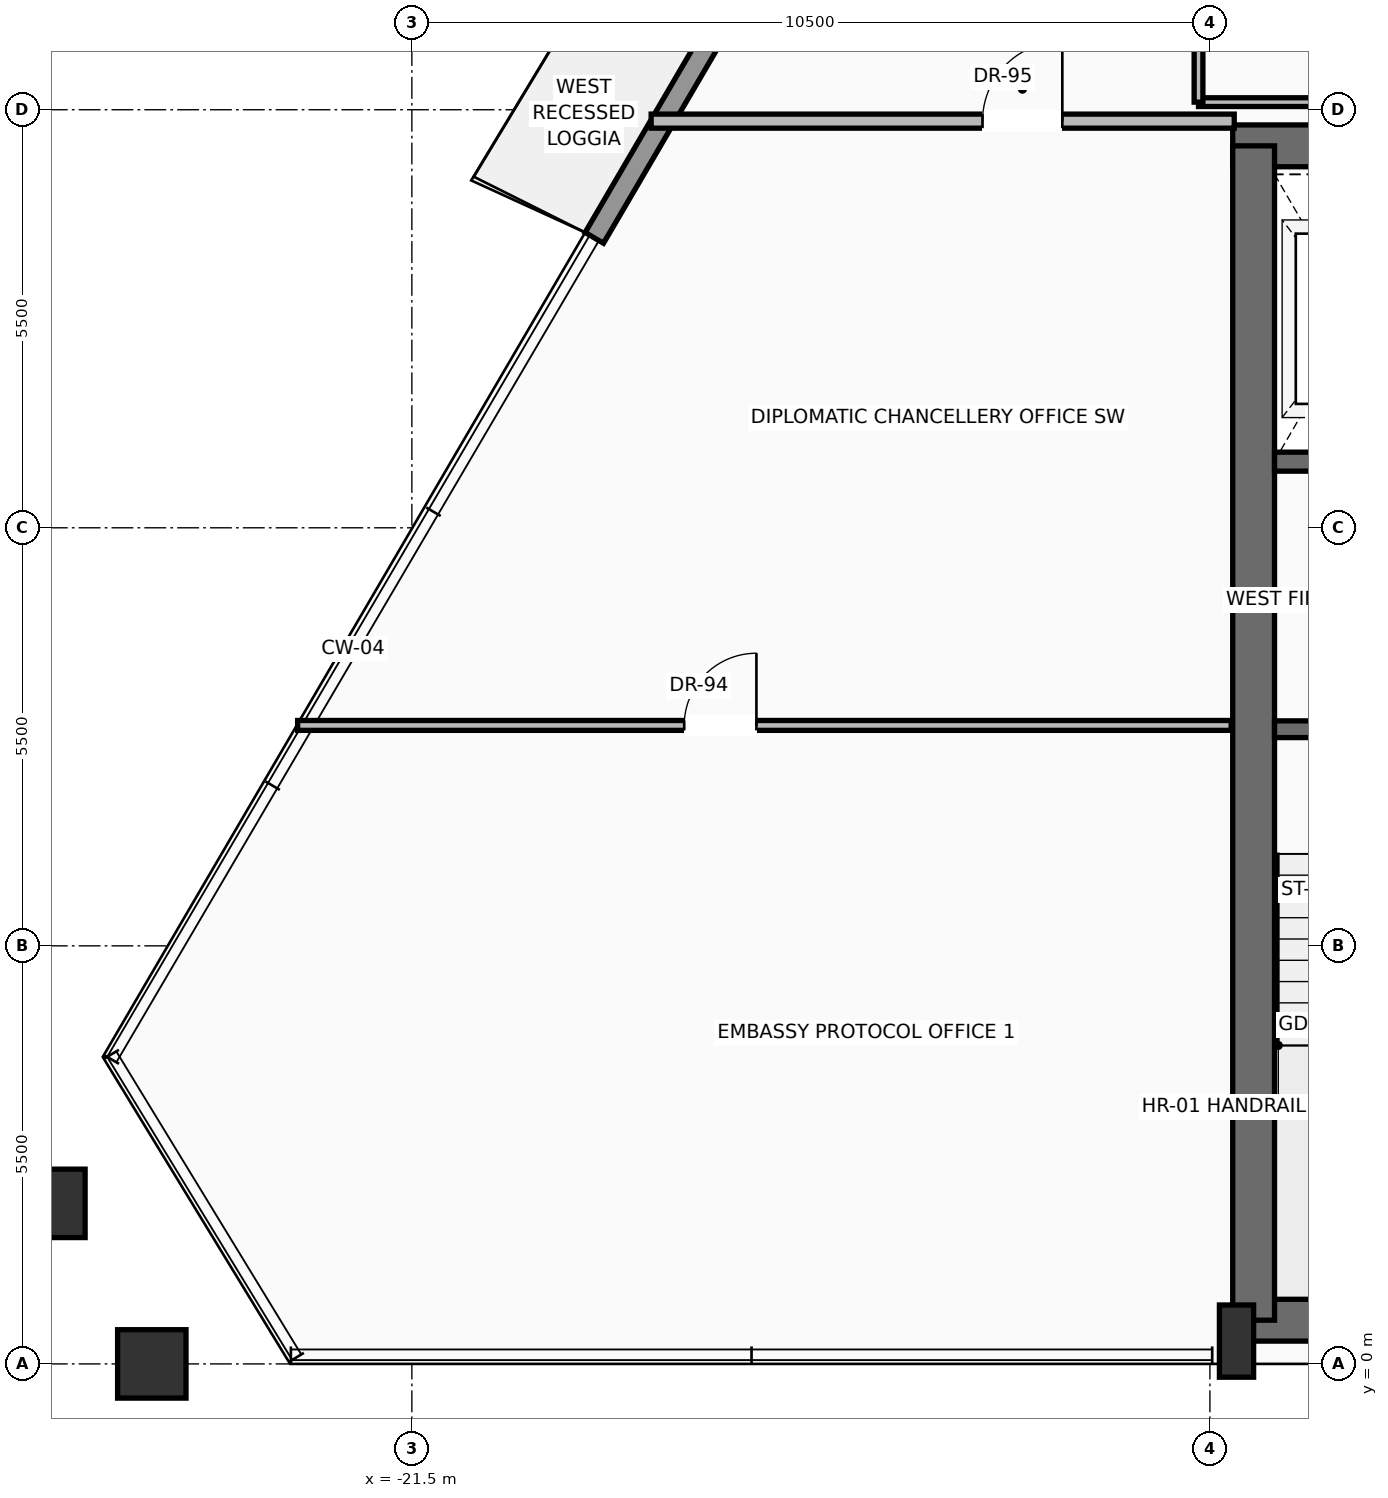
"""IFC4 building model, lengths in metres.
Left out: names, types, materials, properties, quantities, classifications, styles, units other than length and angle.
Written with IfcOpenShell. Run it as: python <this file> out.ifc"""

import sys

from ifc_helpers import new_model, si_unit, direction, frame, frame_2d, origin, origin_2d, place, context, subcontext, project, spatial, rectangle, hollow_rectangle, extrude, source, transform, mapped, element, fill, save


model = new_model("IFC4")
c1 = context("Model", 3, precision=1e-05, world=origin(), true_north=direction((0.0, 1.0)))
c2 = subcontext(c1, "Body", "Model", "MODEL_VIEW")
j1 = project(units=[si_unit("LENGTHUNIT", "METRE"), si_unit("PLANEANGLEUNIT", "RADIAN")], contexts=[c1])
p1 = place(None, origin())
s1 = spatial("IfcSite", under=j1, at=p1, CompositionType="ELEMENT")
p2 = place(p1, origin())
s2 = spatial("IfcBuilding", under=s1, at=p2, CompositionType="ELEMENT")
p3 = place(p2, frame((0.0, 0.0, 251.05)))
s3 = spatial("IfcBuildingStorey", under=s2, at=p3, CompositionType="ELEMENT", Elevation=251.05)
p4 = place(p3, frame((-10.65, 0.575, 0.0), z_axis=(0.0, 0.0, 1.0), x_axis=(1.0, 0.0, 0.0)))
e1 = element("IfcWall", 1, at=p4, inside=s3, PredefinedType="SHEAR", context=c2, shape_type="SweptSolid", body=[
    extrude(rectangle(XDim=21.3, YDim=0.55, at=frame_2d((10.65, 0.0))), origin(), (0.0, 0.0, 1.0), 3.24),
])
p5 = place(p3, frame((-10.7, 16.025, 0.0), z_axis=(0.0, 0.0, 1.0), x_axis=(1.0, 0.0, 0.0)))
e2 = element("IfcWall", 2, at=p5, inside=s3, PredefinedType="SHEAR", context=c2, shape_type="SweptSolid", body=[
    extrude(rectangle(XDim=21.4, YDim=0.55, at=frame_2d((10.7, 0.0))), origin(), (0.0, 0.0, 1.0), 3.24),
])
p6 = place(p5, frame((3.27, 0.0, 0.0)))
e3 = element("IfcOpeningElement", 3, at=p6, cuts=e2, PredefinedType="OPENING", context=c2, shape_type="SweptSolid", body=[
    extrude(rectangle(XDim=1.3, YDim=2.3, at=frame_2d((0.65, 1.15))), frame((0.0, 0.285, 0.0), z_axis=(0.0, -1.0, 0.0), x_axis=(1.0, 0.0, 0.0)), (0.0, 0.0, 1.0), 0.57),
])
p7 = place(p5, frame((9.7, 0.0, 0.0)))
e4 = element("IfcOpeningElement", 4, at=p7, cuts=e2, PredefinedType="OPENING", context=c2, shape_type="SweptSolid", body=[
    extrude(rectangle(XDim=2.0, YDim=2.4, at=frame_2d((1.0, 1.2))), frame((0.0, 0.285, 0.0), z_axis=(0.0, -1.0, 0.0), x_axis=(1.0, 0.0, 0.0)), (0.0, 0.0, 1.0), 0.57),
])
p8 = place(p3, frame((-10.425, 0.575, 0.0), z_axis=(0.0, 0.0, 1.0), x_axis=(0.0, 1.0, 0.0)))
e5 = element("IfcWall", 5, at=p8, inside=s3, PredefinedType="SHEAR", context=c2, shape_type="SweptSolid", body=[
    extrude(rectangle(XDim=15.45, YDim=0.55, at=frame_2d((7.725, 0.0))), origin(), (0.0, 0.0, 1.0), 3.24),
])
m1 = source(origin(), c2, "Body", "SweptSolid", [
    extrude(rectangle(XDim=0.45, YDim=0.95, at=origin_2d()), origin(), (0.0, 0.0, 1.0), 3.45),
])
p9 = place(p3, frame((-10.65, 0.3, 0.0), z_axis=(0.0, 0.0, 1.0), x_axis=(1.0, 0.0, 0.0)))
e6 = element("IfcColumn", 6, at=p9, inside=s3, PredefinedType="PILASTER", context=c2, shape_type="MappedRepresentation", body=[
    mapped(m1, transform((0.0, 0.0, 0.0), scale=1.0)),
])
m2 = source(origin(), c2, "Body", "SweptSolid", [
    extrude(hollow_rectangle(XDim=0.9, YDim=0.9, WallThickness=0.045, at=origin_2d()), origin(), (0.0, 0.0, 1.0), 3.441),
])
p10 = place(p3, frame((-24.922, 0.0, 0.004), z_axis=(-0.001631782148, 0.0, 0.999998668643), x_axis=(0.0, -1.0, 0.0)))
e7 = element("IfcColumn", 7, at=p10, inside=s3, PredefinedType="COLUMN", context=c2, shape_type="MappedRepresentation", body=[
    mapped(m2, transform((0.0, 0.0, 0.0), scale=1.0)),
])
m3 = source(origin(), c2, "Body", "SweptSolid", [
    extrude(hollow_rectangle(XDim=0.9, YDim=0.9, WallThickness=0.045, at=origin_2d()), origin(), (0.0, 0.0, 1.0), 3.442),
])
p11 = place(p3, frame((-26.249, 2.112, 0.004), z_axis=(0.010285300887, -0.017023946296, 0.999802179353), x_axis=(0.855915541946, 0.517115639926, 0.0)))
e8 = element("IfcColumn", 8, at=p11, inside=s3, PredefinedType="COLUMN", context=c2, shape_type="MappedRepresentation", body=[
    mapped(m3, transform((0.0, 0.0, 0.0), scale=1.0)),
])
p12 = place(p3, frame((-19.099, 14.814, 0.0), z_axis=(0.0, 0.0, 1.0), x_axis=(0.505023562938, 0.863105556046, 0.0)))
e9 = element("IfcWall", 9, at=p12, inside=s3, PredefinedType="SOLIDWALL", context=c2, shape_type="SweptSolid", body=[
    extrude(rectangle(XDim=19.748, YDim=0.28, at=frame_2d((9.874, 0.0))), origin(), (0.0, 0.0, 1.0), 2.82),
])
p13 = place(p12, frame((4.74, 0.0, 0.0)))
e10 = element("IfcOpeningElement", 10, at=p13, cuts=e9, PredefinedType="OPENING", context=c2, shape_type="SweptSolid", body=[
    extrude(rectangle(XDim=1.6, YDim=2.35, at=frame_2d((0.8, 1.175))), frame((0.0, 0.15, 0.0), z_axis=(0.0, -1.0, 0.0), x_axis=(1.0, 0.0, 0.0)), (0.0, 0.0, 1.0), 0.3),
])
p14 = place(p12, frame((13.429, 0.0, 0.9)))
e11 = element("IfcOpeningElement", 11, at=p14, cuts=e9, PredefinedType="OPENING", context=c2, shape_type="SweptSolid", body=[
    extrude(rectangle(XDim=1.55, YDim=1.75, at=frame_2d((0.775, 0.875))), frame((0.0, 0.15, 0.0), z_axis=(0.0, -1.0, 0.0), x_axis=(1.0, 0.0, 0.0)), (0.0, 0.0, 1.0), 0.3),
])
p15 = place(p3, frame((-5.5, 8.35, 0.0), z_axis=(0.0, 0.0, 1.0), x_axis=(-1.0, 0.0, 0.0)))
e12 = element("IfcWall", 12, at=p15, inside=s3, PredefinedType="SOLIDWALL", context=c2, shape_type="SweptSolid", body=[
    extrude(rectangle(XDim=4.65, YDim=0.22, at=frame_2d((2.325, 0.0))), origin(), (0.0, 0.0, 1.0), 3.24),
])
p16 = place(p15, frame((2.5, 0.0, 0.0)))
e13 = element("IfcOpeningElement", 13, at=p16, cuts=e12, PredefinedType="OPENING", context=c2, shape_type="SweptSolid", body=[
    extrude(rectangle(XDim=1.15, YDim=2.2, at=frame_2d((0.575, 1.1))), frame((0.0, 0.12, 0.0), z_axis=(0.0, -1.0, 0.0), x_axis=(1.0, 0.0, 0.0)), (0.0, 0.0, 1.0), 0.24),
])
p17 = place(p3, frame((-5.5, 11.87, 0.0), z_axis=(0.0, 0.0, 1.0), x_axis=(-1.0, 0.0, 0.0)))
e14 = element("IfcWall", 14, at=p17, inside=s3, PredefinedType="SOLIDWALL", context=c2, shape_type="SweptSolid", body=[
    extrude(rectangle(XDim=4.65, YDim=0.25, at=frame_2d((2.325, 0.0))), origin(), (0.0, 0.0, 1.0), 3.24),
])
p18 = place(p17, frame((2.95, 0.0, 0.0)))
e15 = element("IfcOpeningElement", 15, at=p18, cuts=e14, PredefinedType="OPENING", context=c2, shape_type="SweptSolid", body=[
    extrude(rectangle(XDim=1.2, YDim=2.25, at=frame_2d((0.6, 1.125))), frame((0.0, 0.135, 0.0), z_axis=(0.0, -1.0, 0.0), x_axis=(1.0, 0.0, 0.0)), (0.0, 0.0, 1.0), 0.27),
])
p19 = place(p3, frame((-18.352, 16.35, 0.0), z_axis=(0.0, 0.0, 1.0), x_axis=(1.0, 0.0, 0.0)))
e16 = element("IfcWall", 16, at=p19, inside=s3, PredefinedType="PARTITIONING", context=c2, shape_type="SweptSolid", body=[
    extrude(rectangle(XDim=7.672, YDim=0.185, at=frame_2d((3.836, 0.0))), origin(), (0.0, 0.0, 1.0), 3.232),
])
p20 = place(p19, frame((4.36, 0.0, 0.0)))
e17 = element("IfcOpeningElement", 17, at=p20, cuts=e16, PredefinedType="OPENING", context=c2, shape_type="SweptSolid", body=[
    extrude(rectangle(XDim=1.05, YDim=2.25, at=frame_2d((0.525, 1.125))), frame((0.0, 0.103, 0.0), z_axis=(0.0, -1.0, 0.0), x_axis=(1.0, 0.0, 0.0)), (0.0, 0.0, 1.0), 0.205),
])
p21 = place(p3, frame((-23.003, 8.4, 0.0), z_axis=(0.0, 0.0, 1.0), x_axis=(1.0, 0.0, 0.0)))
e18 = element("IfcWall", 18, at=p21, inside=s3, PredefinedType="PARTITIONING", context=c2, shape_type="SweptSolid", body=[
    extrude(rectangle(XDim=12.283, YDim=0.13, at=frame_2d((6.142, 0.0))), origin(), (0.0, 0.0, 1.0), 3.232),
])
p22 = place(p21, frame((5.086, 0.0, 0.0)))
e19 = element("IfcOpeningElement", 19, at=p22, cuts=e18, PredefinedType="OPENING", context=c2, shape_type="SweptSolid", body=[
    extrude(rectangle(XDim=0.95, YDim=2.2, at=frame_2d((0.475, 1.1))), frame((0.0, 0.075, 0.0), z_axis=(0.0, -1.0, 0.0), x_axis=(1.0, 0.0, 0.0)), (0.0, 0.0, 1.0), 0.15),
])
p23 = place(p3, frame((-11.15, 16.6, 0.0), z_axis=(0.0, 0.0, 1.0), x_axis=(1.0, 0.0, 0.0)))
e20 = element("IfcWall", 20, at=p23, inside=s3, PredefinedType="PARTITIONING", context=c2, shape_type="SweptSolid", body=[
    extrude(rectangle(XDim=2.65, YDim=0.115, at=frame_2d((1.325, 0.0))), origin(), (0.0, 0.0, 1.0), 3.232),
])
p24 = place(p3, frame((-11.15, 16.6, 0.0), z_axis=(0.0, 0.0, 1.0), x_axis=(0.0, 1.0, 0.0)))
e21 = element("IfcWall", 21, at=p24, inside=s3, PredefinedType="PARTITIONING", context=c2, shape_type="SweptSolid", body=[
    extrude(rectangle(XDim=2.4, YDim=0.115, at=frame_2d((1.2, 0.0))), origin(), (0.0, 0.0, 1.0), 3.232),
])
p25 = place(p24, frame((0.75, 0.0, 0.0)))
e22 = element("IfcOpeningElement", 22, at=p25, cuts=e21, PredefinedType="OPENING", context=c2, shape_type="SweptSolid", body=[
    extrude(rectangle(XDim=0.9, YDim=2.15, at=frame_2d((0.45, 1.075))), frame((0.0, 0.067, 0.0), z_axis=(0.0, -1.0, 0.0), x_axis=(1.0, 0.0, 0.0)), (0.0, 0.0, 1.0), 0.135),
])
m4 = source(origin(), c2, "Body", "SweptSolid", [
    extrude(rectangle(XDim=1.05, YDim=2.25, at=frame_2d((0.525, 1.125))), frame((0.0, 0.025, 0.0), z_axis=(0.0, -1.0, 0.0), x_axis=(1.0, 0.0, 0.0)), (0.0, 0.0, 1.0), 0.05),
])
p26 = place(p20, origin())
e23 = element("IfcDoor", 23, at=p26, inside=s3, OperationType="SINGLE_SWING_RIGHT", PredefinedType="DOOR", context=c2, shape_type="MappedRepresentation", body=[
    mapped(m4, transform((0.0, 0.0, 0.0), scale=1.0)),
])
fill(e17, e23)
m5 = source(origin(), c2, "Body", "SweptSolid", [
    extrude(rectangle(XDim=0.95, YDim=2.2, at=frame_2d((0.475, 1.1))), frame((0.0, 0.025, 0.0), z_axis=(0.0, -1.0, 0.0), x_axis=(1.0, 0.0, 0.0)), (0.0, 0.0, 1.0), 0.05),
])
p27 = place(p22, origin())
e24 = element("IfcDoor", 24, at=p27, inside=s3, OperationType="SINGLE_SWING_RIGHT", PredefinedType="DOOR", context=c2, shape_type="MappedRepresentation", body=[
    mapped(m5, transform((0.0, 0.0, 0.0), scale=1.0)),
])
fill(e19, e24)
save(model, sys.argv[1])
